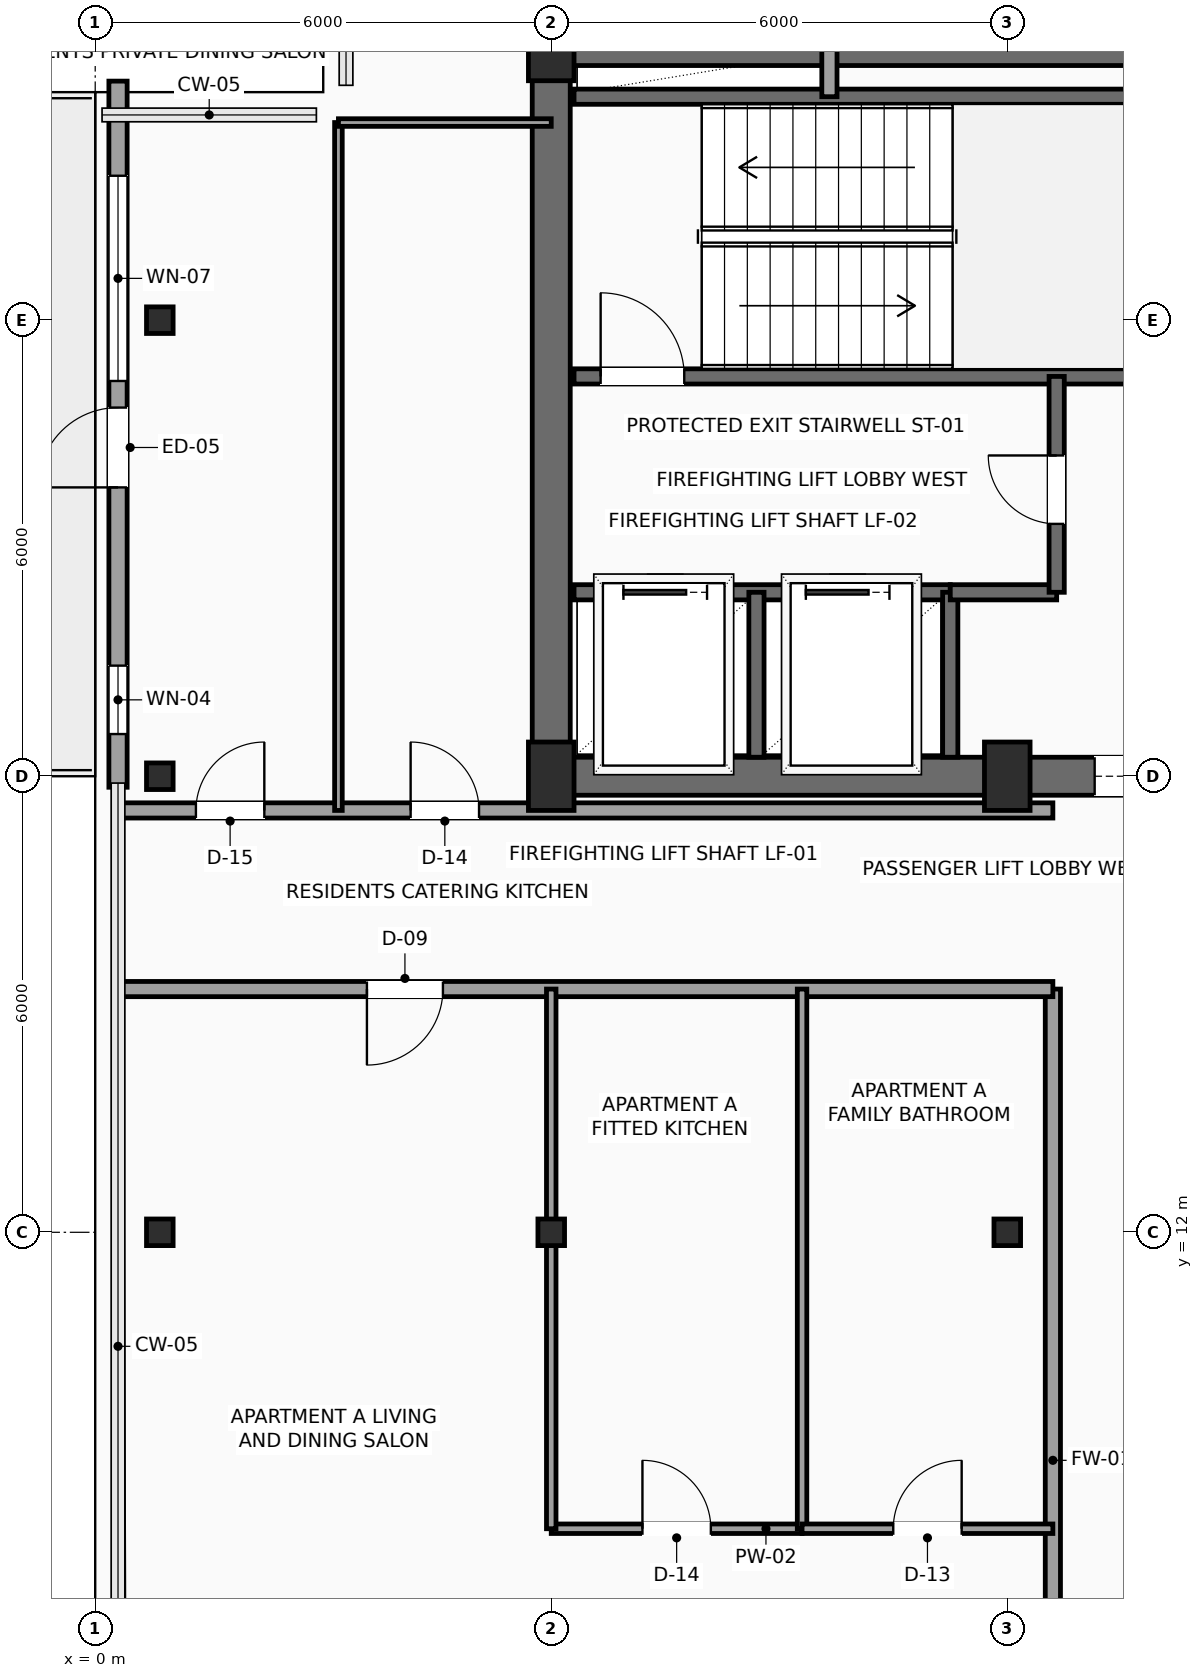
"""IFC4 building model, lengths in metres.
Left out: names, types, materials, properties, quantities, classifications, styles, units other than length and angle.
Written with IfcOpenShell. Run it as: python <this file> out.ifc"""

import sys

from ifc_helpers import new_model, si_unit, direction, frame, frame_2d, origin, origin_2d, place, context, subcontext, project, spatial, rectangle, hollow_rectangle, extrude, element, fill, save


model = new_model("IFC4")
c1 = context("Model", 3, precision=1e-05, world=origin(), true_north=direction((0.0, 1.0)))
c2 = subcontext(c1, "Body", "Model", "MODEL_VIEW")
j1 = project(units=[si_unit("LENGTHUNIT", "METRE"), si_unit("PLANEANGLEUNIT", "RADIAN")], contexts=[c1])
p1 = place(None, origin())
s1 = spatial("IfcSite", under=j1, at=p1, CompositionType="ELEMENT")
p2 = place(p1, origin())
s2 = spatial("IfcBuilding", under=s1, at=p2, CompositionType="ELEMENT")
p3 = place(p2, frame((0.0, 0.0, 257.2)))
s3 = spatial("IfcBuildingStorey", under=s2, at=p3, CompositionType="ELEMENT", Elevation=257.2)
for number, where, z_axis, x_axis in (
    (1, (6.0, 18.0, 0.0), (0.0, 0.0, 1.0), (1.0, 0.0, 0.0)),
    (2, (12.0, 18.0, 0.0), (0.0, 0.0, 1.0), (1.0, 0.0, 0.0)),
    (3, (6.0, 27.6, 0.0), (0.0, 0.0, 1.0), (1.0, 0.0, 0.0)),
):
    element("IfcColumn", number, at=place(p3, frame(where, z_axis=z_axis, x_axis=x_axis)), inside=s3, PredefinedType="COLUMN", context=c2, shape_type="SweptSolid", body=[
        extrude(rectangle(XDim=0.6, YDim=0.9, at=origin_2d()), origin(), (0.0, 0.0, 1.0), 3.5),
    ])
for number, where, z_axis, x_axis in (
    (4, (0.85, 12.0, 0.0), (0.0, 0.0, 1.0), (1.0, 0.0, 0.0)),
    (5, (0.85, 18.0, 0.0), (0.0, 0.0, 1.0), (1.0, 0.0, 0.0)),
    (6, (0.85, 24.0, 0.0), (0.0, 0.0, 1.0), (1.0, 0.0, 0.0)),
    (7, (6.0, 12.0, 0.0), (0.0, 0.0, 1.0), (1.0, 0.0, 0.0)),
    (8, (12.0, 12.0, 0.0), (0.0, 0.0, 1.0), (1.0, 0.0, 0.0)),
):
    element("IfcColumn", number, at=place(p3, frame(where, z_axis=z_axis, x_axis=x_axis)), inside=s3, PredefinedType="COLUMN", context=c2, shape_type="SweptSolid", body=[
        extrude(hollow_rectangle(XDim=0.35, YDim=0.35, WallThickness=0.016, InnerFilletRadius=0.016, OuterFilletRadius=0.032, at=origin_2d()), origin(), (0.0, 0.0, 1.0), 3.5),
    ])
p4 = place(p3, frame((0.3, 17.855, 0.0), z_axis=(0.0, 0.0, 1.0), x_axis=(0.0, 1.0, 0.0)))
e9 = element("IfcWall", 9, at=p4, inside=s3, PredefinedType="SOLIDWALL", context=c2, shape_type="SweptSolid", body=[
    extrude(rectangle(XDim=9.29, YDim=0.24, at=frame_2d((4.645, 0.0))), origin(), (0.0, 0.0, 1.0), 3.3),
])
p5 = place(p4, frame((3.945, 0.0, 0.0)))
e10 = element("IfcOpeningElement", 10, at=p5, cuts=e9, PredefinedType="OPENING", context=c2, shape_type="SweptSolid", body=[
    extrude(rectangle(XDim=1.05, YDim=2.2, at=frame_2d((0.525, 1.1))), frame((0.0, 0.13, 0.0), z_axis=(0.0, -1.0, 0.0), x_axis=(1.0, 0.0, 0.0)), (0.0, 0.0, 1.0), 0.26),
])
p6 = place(p4, frame((5.345, 0.0, 0.6)))
e11 = element("IfcOpeningElement", 11, at=p6, cuts=e9, PredefinedType="OPENING", context=c2, shape_type="SweptSolid", body=[
    extrude(rectangle(XDim=2.7, YDim=2.3, at=frame_2d((1.35, 1.15))), frame((0.0, 0.13, 0.0), z_axis=(0.0, -1.0, 0.0), x_axis=(1.0, 0.0, 0.0)), (0.0, 0.0, 1.0), 0.26),
])
p7 = place(p4, frame((0.7, 0.0, 0.6)))
e12 = element("IfcOpeningElement", 12, at=p7, cuts=e9, PredefinedType="OPENING", context=c2, shape_type="SweptSolid", body=[
    extrude(rectangle(XDim=0.9, YDim=2.2, at=frame_2d((0.45, 1.1))), frame((0.0, 0.13, 0.0), z_axis=(0.0, -1.0, 0.0), x_axis=(1.0, 0.0, 0.0)), (0.0, 0.0, 1.0), 0.26),
])
p8 = place(p3, frame((6.0, 18.0, 0.0), z_axis=(0.0, 0.0, 1.0), x_axis=(1.0, 0.0, 0.0)))
e13 = element("IfcWall", 13, at=p8, inside=s3, PredefinedType="SHEAR", context=c2, shape_type="SweptSolid", body=[
    extrude(rectangle(XDim=12.0, YDim=0.5, at=frame_2d((6.0, 0.0))), origin(), (0.0, 0.0, 1.0), 3.3),
])
p9 = place(p8, frame((7.15, 0.0, 0.0)))
e14 = element("IfcOpeningElement", 14, at=p9, cuts=e13, PredefinedType="OPENING", context=c2, shape_type="SweptSolid", body=[
    extrude(rectangle(XDim=1.6, YDim=2.3, at=frame_2d((0.8, 1.15))), frame((0.0, 0.26, 0.0), z_axis=(0.0, -1.0, 0.0), x_axis=(1.0, 0.0, 0.0)), (0.0, 0.0, 1.0), 0.52),
])
p10 = place(p3, frame((6.0, 27.6, 0.0), z_axis=(0.0, 0.0, 1.0), x_axis=(1.0, 0.0, 0.0)))
e15 = element("IfcWall", 15, at=p10, inside=s3, PredefinedType="SHEAR", context=c2, shape_type="SweptSolid", body=[
    extrude(rectangle(XDim=12.0, YDim=0.5, at=frame_2d((6.0, 0.0))), origin(), (0.0, 0.0, 1.0), 3.3),
])
p11 = place(p10, frame((10.3, 0.0, 0.0)))
e16 = element("IfcOpeningElement", 16, at=p11, cuts=e15, PredefinedType="OPENING", context=c2, shape_type="SweptSolid", body=[
    extrude(rectangle(XDim=0.9, YDim=2.15, at=frame_2d((0.45, 1.075))), frame((0.0, 0.26, 0.0), z_axis=(0.0, -1.0, 0.0), x_axis=(1.0, 0.0, 0.0)), (0.0, 0.0, 1.0), 0.52),
])
p12 = place(p3, frame((6.0, 18.0, 0.0), z_axis=(0.0, 0.0, 1.0), x_axis=(0.0, 1.0, 0.0)))
e17 = element("IfcWall", 17, at=p12, inside=s3, PredefinedType="SHEAR", context=c2, shape_type="SweptSolid", body=[
    extrude(rectangle(XDim=9.6, YDim=0.5, at=frame_2d((4.8, 0.0))), origin(), (0.0, 0.0, 1.0), 3.3),
])
p13 = place(p3, frame((6.3, 23.26, 0.0), z_axis=(0.0, 0.0, 1.0), x_axis=(1.0, 0.0, 0.0)))
e18 = element("IfcWall", 18, at=p13, inside=s3, PredefinedType="SHEAR", context=c2, shape_type="SweptSolid", body=[
    extrude(rectangle(XDim=8.88, YDim=0.2, at=frame_2d((4.44, 0.0))), origin(), (0.0, 0.0, 1.0), 3.3),
])
p14 = place(p13, frame((0.35, 0.0, 0.0)))
e19 = element("IfcOpeningElement", 19, at=p14, cuts=e18, PredefinedType="OPENING", context=c2, shape_type="SweptSolid", body=[
    extrude(rectangle(XDim=1.1, YDim=2.2, at=frame_2d((0.55, 1.1))), frame((0.0, 0.11, 0.0), z_axis=(0.0, -1.0, 0.0), x_axis=(1.0, 0.0, 0.0)), (0.0, 0.0, 1.0), 0.22),
])
p15 = place(p3, frame((6.3, 26.94, 0.0), z_axis=(0.0, 0.0, 1.0), x_axis=(1.0, 0.0, 0.0)))
e20 = element("IfcWall", 20, at=p15, inside=s3, PredefinedType="SHEAR", context=c2, shape_type="SweptSolid", body=[
    extrude(rectangle(XDim=8.88, YDim=0.2, at=frame_2d((4.44, 0.0))), origin(), (0.0, 0.0, 1.0), 3.3),
])
p16 = place(p3, frame((6.3, 20.42, 0.0), z_axis=(0.0, 0.0, 1.0), x_axis=(1.0, 0.0, 0.0)))
e21 = element("IfcWall", 21, at=p16, inside=s3, PredefinedType="SHEAR", context=c2, shape_type="SweptSolid", body=[
    extrude(rectangle(XDim=4.95, YDim=0.2, at=frame_2d((2.475, 0.0))), origin(), (0.0, 0.0, 1.0), 3.3),
])
p17 = place(p16, frame((0.65, 0.0, 0.0)))
e22 = element("IfcOpeningElement", 22, at=p17, cuts=e21, PredefinedType="OPENING", context=c2, shape_type="SweptSolid", body=[
    extrude(rectangle(XDim=1.1, YDim=2.2, at=frame_2d((0.55, 1.1))), frame((0.0, 0.11, 0.0), z_axis=(0.0, -1.0, 0.0), x_axis=(1.0, 0.0, 0.0)), (0.0, 0.0, 1.0), 0.22),
])
p18 = place(p16, frame((3.05, 0.0, 0.0)))
e23 = element("IfcOpeningElement", 23, at=p18, cuts=e21, PredefinedType="OPENING", context=c2, shape_type="SweptSolid", body=[
    extrude(rectangle(XDim=1.1, YDim=2.2, at=frame_2d((0.55, 1.1))), frame((0.0, 0.11, 0.0), z_axis=(0.0, -1.0, 0.0), x_axis=(1.0, 0.0, 0.0)), (0.0, 0.0, 1.0), 0.22),
])
for number, where, z_axis, x_axis in (
    (24, (8.7, 18.25, 0.0), (0.0, 0.0, 1.0), (0.0, 1.0, 0.0)),
    (25, (11.25, 18.25, 0.0), (0.0, 0.0, 1.0), (0.0, 1.0, 0.0)),
):
    element("IfcWall", number, at=place(p3, frame(where, z_axis=z_axis, x_axis=x_axis)), inside=s3, PredefinedType="SHEAR", context=c2, shape_type="SweptSolid", body=[
        extrude(rectangle(XDim=2.17, YDim=0.2, at=frame_2d((1.085, 0.0))), origin(), (0.0, 0.0, 1.0), 3.3),
    ])
p19 = place(p3, frame((11.25, 20.42, 0.0), z_axis=(0.0, 0.0, 1.0), x_axis=(1.0, 0.0, 0.0)))
e26 = element("IfcWall", 26, at=p19, inside=s3, PredefinedType="SHEAR", context=c2, shape_type="SweptSolid", body=[
    extrude(rectangle(XDim=1.4, YDim=0.2, at=frame_2d((0.7, 0.0))), origin(), (0.0, 0.0, 1.0), 3.3),
])
p20 = place(p3, frame((12.65, 20.42, 0.0), z_axis=(0.0, 0.0, 1.0), x_axis=(0.0, 1.0, 0.0)))
e27 = element("IfcWall", 27, at=p20, inside=s3, PredefinedType="SHEAR", context=c2, shape_type="SweptSolid", body=[
    extrude(rectangle(XDim=2.84, YDim=0.2, at=frame_2d((1.42, 0.0))), origin(), (0.0, 0.0, 1.0), 3.3),
])
p21 = place(p20, frame((0.9, 0.0, 0.0)))
e28 = element("IfcOpeningElement", 28, at=p21, cuts=e27, PredefinedType="OPENING", context=c2, shape_type="SweptSolid", body=[
    extrude(rectangle(XDim=0.9, YDim=2.15, at=frame_2d((0.45, 1.075))), frame((0.0, 0.11, 0.0), z_axis=(0.0, -1.0, 0.0), x_axis=(1.0, 0.0, 0.0)), (0.0, 0.0, 1.0), 0.22),
])
p22 = place(p3, frame((9.66, 26.94, 0.0), z_axis=(0.0, 0.0, 1.0), x_axis=(0.0, 1.0, 0.0)))
e29 = element("IfcWall", 29, at=p22, inside=s3, PredefinedType="SOLIDWALL", context=c2, shape_type="SweptSolid", body=[
    extrude(rectangle(XDim=0.64, YDim=0.2, at=frame_2d((0.32, 0.0))), origin(), (0.0, 0.0, 1.0), 3.3),
])
p23 = place(p3, frame((12.6, 1.8, 0.0), z_axis=(0.0, 0.0, 1.0), x_axis=(0.0, 1.0, 0.0)))
e30 = element("IfcWall", 30, at=p23, inside=s3, PredefinedType="SOLIDWALL", context=c2, shape_type="SweptSolid", body=[
    extrude(rectangle(XDim=13.4, YDim=0.2, at=frame_2d((6.7, 0.0))), origin(), (0.0, 0.0, 1.0), 3.3),
])
p24 = place(p3, frame((12.6, 15.2, 0.0), z_axis=(0.0, 0.0, 1.0), x_axis=(-1.0, 0.0, 0.0)))
e31 = element("IfcWall", 31, at=p24, inside=s3, PredefinedType="SOLIDWALL", context=c2, shape_type="SweptSolid", body=[
    extrude(rectangle(XDim=12.3, YDim=0.2, at=frame_2d((6.15, 0.0))), origin(), (0.0, 0.0, 1.0), 2.932),
])
p25 = place(p24, frame((8.025, 0.0, 0.0)))
e32 = element("IfcOpeningElement", 32, at=p25, cuts=e31, PredefinedType="OPENING", context=c2, shape_type="SweptSolid", body=[
    extrude(rectangle(XDim=1.0, YDim=2.2, at=frame_2d((0.5, 1.1))), frame((0.0, 0.11, 0.0), z_axis=(0.0, -1.0, 0.0), x_axis=(1.0, 0.0, 0.0)), (0.0, 0.0, 1.0), 0.22),
])
p26 = place(p3, frame((0.3, 17.55, 0.0), z_axis=(0.0, 0.0, 1.0), x_axis=(1.0, 0.0, 0.0)))
e33 = element("IfcWall", 33, at=p26, inside=s3, PredefinedType="SOLIDWALL", context=c2, shape_type="SweptSolid", body=[
    extrude(rectangle(XDim=12.3, YDim=0.2, at=frame_2d((6.15, 0.0))), origin(), (0.0, 0.0, 1.0), 3.3),
])
p27 = place(p26, frame((1.025, 0.0, 0.0)))
e34 = element("IfcOpeningElement", 34, at=p27, cuts=e33, PredefinedType="OPENING", context=c2, shape_type="SweptSolid", body=[
    extrude(rectangle(XDim=0.9, YDim=2.1, at=frame_2d((0.45, 1.05))), frame((0.0, 0.11, 0.0), z_axis=(0.0, -1.0, 0.0), x_axis=(1.0, 0.0, 0.0)), (0.0, 0.0, 1.0), 0.22),
])
p28 = place(p26, frame((3.85, 0.0, 0.0)))
e35 = element("IfcOpeningElement", 35, at=p28, cuts=e33, PredefinedType="OPENING", context=c2, shape_type="SweptSolid", body=[
    extrude(rectangle(XDim=0.9, YDim=2.1, at=frame_2d((0.45, 1.05))), frame((0.0, 0.11, 0.0), z_axis=(0.0, -1.0, 0.0), x_axis=(1.0, 0.0, 0.0)), (0.0, 0.0, 1.0), 0.22),
])
p29 = place(p3, frame((0.35, 0.3, 0.0), z_axis=(0.0, 0.0, 1.0), x_axis=(-0.003358984819, 0.999994358595, 0.0)))
e36 = element("IfcWall", 36, at=p29, inside=s3, PredefinedType="PARTITIONING", context=c2, shape_type="SweptSolid", body=[
    extrude(rectangle(XDim=14.9, YDim=0.1, at=frame_2d((7.45, 0.0))), origin(), (0.0, 0.0, 1.0), 3.3),
])
p30 = place(p3, frame((6.0, 8.1, 0.0), z_axis=(0.0, 0.0, 1.0), x_axis=(1.0, 0.0, 0.0)))
e37 = element("IfcWall", 37, at=p30, inside=s3, PredefinedType="PARTITIONING", context=c2, shape_type="SweptSolid", body=[
    extrude(rectangle(XDim=3.3, YDim=0.125, at=frame_2d((1.65, 0.0))), origin(), (0.0, 0.0, 1.0), 3.3),
])
p31 = place(p30, frame((1.2, 0.0, 0.0)))
e38 = element("IfcOpeningElement", 38, at=p31, cuts=e37, PredefinedType="OPENING", context=c2, shape_type="SweptSolid", body=[
    extrude(rectangle(XDim=0.9, YDim=2.1, at=frame_2d((0.45, 1.05))), frame((0.0, 0.073, 0.0), z_axis=(0.0, -1.0, 0.0), x_axis=(1.0, 0.0, 0.0)), (0.0, 0.0, 1.0), 0.145),
])
p32 = place(p3, frame((6.0, 8.1, 0.0), z_axis=(0.0, 0.0, 1.0), x_axis=(0.0, 1.0, 0.0)))
e39 = element("IfcWall", 39, at=p32, inside=s3, PredefinedType="PARTITIONING", context=c2, shape_type="SweptSolid", body=[
    extrude(rectangle(XDim=7.1, YDim=0.125, at=frame_2d((3.55, 0.0))), origin(), (0.0, 0.0, 1.0), 2.992),
])
p33 = place(p3, frame((9.3, 8.1, 0.0), z_axis=(0.0, 0.0, 1.0), x_axis=(0.0, 1.0, 0.0)))
e40 = element("IfcWall", 40, at=p33, inside=s3, PredefinedType="PARTITIONING", context=c2, shape_type="SweptSolid", body=[
    extrude(rectangle(XDim=7.1, YDim=0.125, at=frame_2d((3.55, 0.0))), origin(), (0.0, 0.0, 1.0), 3.3),
])
p34 = place(p3, frame((9.3, 8.1, 0.0), z_axis=(0.0, 0.0, 1.0), x_axis=(1.0, 0.0, 0.0)))
e41 = element("IfcWall", 41, at=p34, inside=s3, PredefinedType="PARTITIONING", context=c2, shape_type="SweptSolid", body=[
    extrude(rectangle(XDim=3.3, YDim=0.125, at=frame_2d((1.65, 0.0))), origin(), (0.0, 0.0, 1.0), 3.3),
])
p35 = place(p34, frame((1.2, 0.0, 0.0)))
e42 = element("IfcOpeningElement", 42, at=p35, cuts=e41, PredefinedType="OPENING", context=c2, shape_type="SweptSolid", body=[
    extrude(rectangle(XDim=0.9, YDim=2.1, at=frame_2d((0.45, 1.05))), frame((0.0, 0.073, 0.0), z_axis=(0.0, -1.0, 0.0), x_axis=(1.0, 0.0, 0.0)), (0.0, 0.0, 1.0), 0.145),
])
p36 = place(p3, frame((3.2, 17.55, 0.0), z_axis=(0.0, 0.0, 1.0), x_axis=(0.0, 1.0, 0.0)))
e43 = element("IfcWall", 43, at=p36, inside=s3, PredefinedType="PARTITIONING", context=c2, shape_type="SweptSolid", body=[
    extrude(rectangle(XDim=9.05, YDim=0.1, at=frame_2d((4.525, 0.0))), origin(), (0.0, 0.0, 1.0), 3.3),
])
p37 = place(p3, frame((3.2, 26.6, 0.0), z_axis=(0.0, 0.0, 1.0), x_axis=(1.0, 0.0, 0.0)))
e44 = element("IfcWall", 44, at=p37, inside=s3, PredefinedType="PARTITIONING", context=c2, shape_type="SweptSolid", body=[
    extrude(rectangle(XDim=2.8, YDim=0.1, at=frame_2d((1.4, 0.0))), origin(), (0.0, 0.0, 1.0), 3.3),
])
p38 = place(p5, origin())
e45 = element("IfcDoor", 45, at=p38, inside=s3, OperationType="SINGLE_SWING_LEFT", PredefinedType="DOOR", context=c2, shape_type="SweptSolid", body=[
    extrude(rectangle(XDim=1.05, YDim=2.2, at=frame_2d((0.525, 1.1))), frame((0.0, 0.025, 0.0), z_axis=(0.0, -1.0, 0.0), x_axis=(1.0, 0.0, 0.0)), (0.0, 0.0, 1.0), 0.05),
])
fill(e10, e45)
p39 = place(p6, origin())
e46 = element("IfcWindow", 46, at=p39, inside=s3, PartitioningType="SINGLE_PANEL", PredefinedType="WINDOW", context=c2, shape_type="SweptSolid", body=[
    extrude(rectangle(XDim=2.7, YDim=2.3, at=frame_2d((1.35, 1.15))), frame((0.0, 0.03, 0.0), z_axis=(0.0, -1.0, 0.0), x_axis=(1.0, 0.0, 0.0)), (0.0, 0.0, 1.0), 0.06),
])
fill(e11, e46)
p40 = place(p7, origin())
e47 = element("IfcWindow", 47, at=p40, inside=s3, PartitioningType="SINGLE_PANEL", PredefinedType="WINDOW", context=c2, shape_type="SweptSolid", body=[
    extrude(rectangle(XDim=0.9, YDim=2.2, at=frame_2d((0.45, 1.1))), frame((0.0, 0.03, 0.0), z_axis=(0.0, -1.0, 0.0), x_axis=(1.0, 0.0, 0.0)), (0.0, 0.0, 1.0), 0.06),
])
fill(e12, e47)
p41 = place(p9, origin())
e48 = element("IfcDoor", 48, at=p41, inside=s3, OperationType="DOUBLE_DOOR_SLIDING", PredefinedType="DOOR", context=c2, shape_type="SweptSolid", body=[
    extrude(rectangle(XDim=1.6, YDim=2.3, at=frame_2d((0.8, 1.15))), frame((0.0, 0.025, 0.0), z_axis=(0.0, -1.0, 0.0), x_axis=(1.0, 0.0, 0.0)), (0.0, 0.0, 1.0), 0.05),
])
fill(e14, e48)
p42 = place(p14, origin())
e49 = element("IfcDoor", 49, at=p42, inside=s3, OperationType="SINGLE_SWING_LEFT", PredefinedType="DOOR", context=c2, shape_type="SweptSolid", body=[
    extrude(rectangle(XDim=1.1, YDim=2.2, at=frame_2d((0.55, 1.1))), frame((0.0, 0.025, 0.0), z_axis=(0.0, -1.0, 0.0), x_axis=(1.0, 0.0, 0.0)), (0.0, 0.0, 1.0), 0.05),
])
fill(e19, e49)
p43 = place(p17, origin())
e50 = element("IfcDoor", 50, at=p43, inside=s3, OperationType="SLIDING_TO_LEFT", PredefinedType="DOOR", context=c2, shape_type="SweptSolid", body=[
    extrude(rectangle(XDim=1.1, YDim=2.2, at=frame_2d((0.55, 1.1))), frame((0.0, 0.025, 0.0), z_axis=(0.0, -1.0, 0.0), x_axis=(1.0, 0.0, 0.0)), (0.0, 0.0, 1.0), 0.05),
])
fill(e22, e50)
p44 = place(p18, origin())
e51 = element("IfcDoor", 51, at=p44, inside=s3, OperationType="SLIDING_TO_LEFT", PredefinedType="DOOR", context=c2, shape_type="SweptSolid", body=[
    extrude(rectangle(XDim=1.1, YDim=2.2, at=frame_2d((0.55, 1.1))), frame((0.0, 0.025, 0.0), z_axis=(0.0, -1.0, 0.0), x_axis=(1.0, 0.0, 0.0)), (0.0, 0.0, 1.0), 0.05),
])
fill(e23, e51)
p45 = place(p21, origin())
e52 = element("IfcDoor", 52, at=p45, inside=s3, OperationType="SINGLE_SWING_RIGHT", PredefinedType="DOOR", context=c2, shape_type="SweptSolid", body=[
    extrude(rectangle(XDim=0.9, YDim=2.15, at=frame_2d((0.45, 1.075))), frame((0.0, 0.025, 0.0), z_axis=(0.0, -1.0, 0.0), x_axis=(1.0, 0.0, 0.0)), (0.0, 0.0, 1.0), 0.05),
])
fill(e28, e52)
p46 = place(p25, origin())
e53 = element("IfcDoor", 53, at=p46, inside=s3, OperationType="SINGLE_SWING_RIGHT", PredefinedType="DOOR", context=c2, shape_type="SweptSolid", body=[
    extrude(rectangle(XDim=1.0, YDim=2.2, at=frame_2d((0.5, 1.1))), frame((0.0, 0.025, 0.0), z_axis=(0.0, -1.0, 0.0), x_axis=(1.0, 0.0, 0.0)), (0.0, 0.0, 1.0), 0.05),
])
fill(e32, e53)
p47 = place(p27, origin())
e54 = element("IfcDoor", 54, at=p47, inside=s3, OperationType="SINGLE_SWING_RIGHT", PredefinedType="DOOR", context=c2, shape_type="SweptSolid", body=[
    extrude(rectangle(XDim=0.9, YDim=2.1, at=frame_2d((0.45, 1.05))), frame((0.0, 0.025, 0.0), z_axis=(0.0, -1.0, 0.0), x_axis=(1.0, 0.0, 0.0)), (0.0, 0.0, 1.0), 0.05),
])
fill(e34, e54)
p48 = place(p28, origin())
e55 = element("IfcDoor", 55, at=p48, inside=s3, OperationType="SINGLE_SWING_LEFT", PredefinedType="DOOR", context=c2, shape_type="SweptSolid", body=[
    extrude(rectangle(XDim=0.9, YDim=2.1, at=frame_2d((0.45, 1.05))), frame((0.0, 0.025, 0.0), z_axis=(0.0, -1.0, 0.0), x_axis=(1.0, 0.0, 0.0)), (0.0, 0.0, 1.0), 0.05),
])
fill(e35, e55)
p49 = place(p31, origin())
e56 = element("IfcDoor", 56, at=p49, inside=s3, OperationType="SINGLE_SWING_LEFT", PredefinedType="DOOR", context=c2, shape_type="SweptSolid", body=[
    extrude(rectangle(XDim=0.9, YDim=2.1, at=frame_2d((0.45, 1.05))), frame((0.0, 0.025, 0.0), z_axis=(0.0, -1.0, 0.0), x_axis=(1.0, 0.0, 0.0)), (0.0, 0.0, 1.0), 0.05),
])
fill(e38, e56)
p50 = place(p35, origin())
e57 = element("IfcDoor", 57, at=p50, inside=s3, OperationType="SINGLE_SWING_RIGHT", PredefinedType="DOOR", context=c2, shape_type="SweptSolid", body=[
    extrude(rectangle(XDim=0.9, YDim=2.1, at=frame_2d((0.45, 1.05))), frame((0.0, 0.025, 0.0), z_axis=(0.0, -1.0, 0.0), x_axis=(1.0, 0.0, 0.0)), (0.0, 0.0, 1.0), 0.05),
])
fill(e42, e57)
save(model, sys.argv[1])
